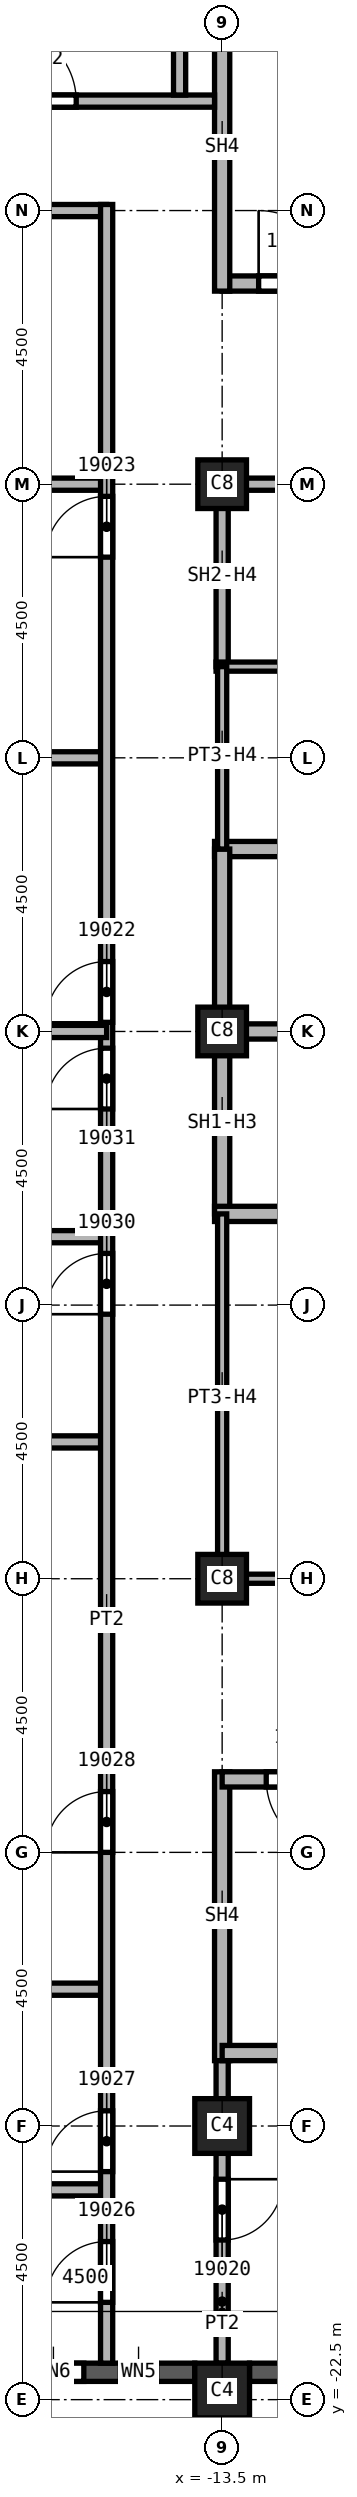
"""IFC4 building model, lengths in metres.
Left out: names, types, materials, properties, quantities, classifications, styles, units other than length and angle.
Written with IfcOpenShell. Run it as: python <this file> out.ifc"""

import sys

from ifc_helpers import new_model, si_unit, direction, frame, frame_2d, origin, origin_2d, place, context, subcontext, project, spatial, rectangle, extrude, element, fill, save


model = new_model("IFC4")
c1 = context("Model", 3, precision=1e-05, world=origin(), true_north=direction((0.0, 1.0)))
c2 = subcontext(c1, "Body", "Model", "MODEL_VIEW")
j1 = project(units=[si_unit("LENGTHUNIT", "METRE"), si_unit("PLANEANGLEUNIT", "RADIAN")], contexts=[c1])
p1 = place(None, origin())
s1 = spatial("IfcSite", under=j1, at=p1, CompositionType="ELEMENT")
p2 = place(p1, origin())
s2 = spatial("IfcBuilding", under=s1, at=p2, CompositionType="ELEMENT")
p3 = place(p2, frame((0.0, 0.0, 278.0)))
s3 = spatial("IfcBuildingStorey", under=s2, at=p3, CompositionType="ELEMENT", Elevation=278.0)
p4 = place(p3, frame((-13.5, -18.0, 0.0), z_axis=(0.0, 0.0, 1.0), x_axis=(1.0, 0.0, 0.0)))
e1 = element("IfcColumn", 1, at=p4, inside=s3, PredefinedType="COLUMN", context=c2, shape_type="SweptSolid", body=[
    extrude(rectangle(XDim=0.9, YDim=0.9, at=origin_2d()), origin(), (0.0, 0.0, 1.0), 3.72),
])
for number, where, z_axis, x_axis in (
    (2, (-13.5, 0.0, 0.0), (0.0, 0.0, 1.0), (1.0, 0.0, 0.0)),
    (3, (-13.5, 9.0, 0.0), (0.0, 0.0, 1.0), (1.0, 0.0, 0.0)),
    (4, (-13.5, -9.0, 0.0), (0.0, 0.0, 1.0), (1.0, 0.0, 0.0)),
):
    element("IfcColumn", number, at=place(p3, frame(where, z_axis=z_axis, x_axis=x_axis)), inside=s3, PredefinedType="COLUMN", context=c2, shape_type="SweptSolid", body=[
        extrude(rectangle(XDim=0.8, YDim=0.8, at=origin_2d()), origin(), (0.0, 0.0, 1.0), 3.72),
    ])
p5 = place(p3, frame((-13.5, -22.35, 0.0), z_axis=(0.0, 0.0, 1.0), x_axis=(1.0, 0.0, 0.0)))
e5 = element("IfcColumn", 5, at=p5, inside=s3, PredefinedType="COLUMN", context=c2, shape_type="SweptSolid", body=[
    extrude(rectangle(XDim=0.9, YDim=0.9, at=origin_2d()), origin(), (0.0, 0.0, 1.0), 3.72),
])
p6 = place(p3, frame((-17.55, -22.05, 0.0), z_axis=(0.0, 0.0, 1.0), x_axis=(1.0, 0.0, 0.0)))
e6 = element("IfcWall", 6, at=p6, inside=s3, PredefinedType="SOLIDWALL", context=c2, shape_type="SweptSolid", body=[
    extrude(rectangle(XDim=3.6, YDim=0.3, at=frame_2d((1.8, 0.0))), origin(), (0.0, 0.0, 1.0), 3.12),
])
p7 = place(p6, frame((0.775, 0.0, 0.8)))
e7 = element("IfcOpeningElement", 7, at=p7, cuts=e6, PredefinedType="OPENING", context=c2, shape_type="SweptSolid", body=[
    extrude(rectangle(XDim=1.0, YDim=1.95, at=frame_2d((0.5, 0.975))), frame((0.0, 0.15, 0.0), z_axis=(0.0, -1.0, 0.0), x_axis=(1.0, 0.0, 0.0)), (0.0, 0.0, 1.0), 0.3),
])
p8 = place(p6, frame((2.375, 0.0, 0.8)))
e8 = element("IfcOpeningElement", 8, at=p8, cuts=e6, PredefinedType="OPENING", context=c2, shape_type="SweptSolid", body=[
    extrude(rectangle(XDim=0.6, YDim=1.95, at=frame_2d((0.3, 0.975))), frame((0.0, 0.15, 0.0), z_axis=(0.0, -1.0, 0.0), x_axis=(1.0, 0.0, 0.0)), (0.0, 0.0, 1.0), 0.3),
])
p9 = place(p3, frame((-13.05, -22.05, 0.0), z_axis=(0.0, 0.0, 1.0), x_axis=(1.0, 0.0, 0.0)))
e9 = element("IfcWall", 9, at=p9, inside=s3, PredefinedType="SOLIDWALL", context=c2, shape_type="SweptSolid", body=[
    extrude(rectangle(XDim=3.6, YDim=0.3, at=frame_2d((1.8, 0.0))), origin(), (0.0, 0.0, 1.0), 3.12),
])
p10 = place(p9, frame((0.6, 0.0, 0.8)))
e10 = element("IfcOpeningElement", 10, at=p10, cuts=e9, PredefinedType="OPENING", context=c2, shape_type="SweptSolid", body=[
    extrude(rectangle(XDim=2.4, YDim=1.95, at=frame_2d((1.2, 0.975))), frame((0.0, 0.15, 0.0), z_axis=(0.0, -1.0, 0.0), x_axis=(1.0, 0.0, 0.0)), (0.0, 0.0, 1.0), 0.3),
])
for number, where, z_axis, x_axis in (
    (11, (-26.55, -15.75, 0.0), (0.0, 0.0, 1.0), (1.0, 0.0, 0.0)),
    (12, (-26.55, -6.75, 0.0), (0.0, 0.0, 1.0), (1.0, 0.0, 0.0)),
    (13, (-26.55, -3.375, 0.0), (0.0, 0.0, 1.0), (1.0, 0.0, 0.0)),
    (14, (-26.55, 4.5, 0.0), (0.0, 0.0, 1.0), (1.0, 0.0, 0.0)),
    (15, (-26.55, 9.0, 0.0), (0.0, 0.0, 1.0), (1.0, 0.0, 0.0)),
):
    element("IfcWall", number, at=place(p3, frame(where, z_axis=z_axis, x_axis=x_axis)), inside=s3, PredefinedType="PARTITIONING", context=c2, shape_type="SweptSolid", body=[
        extrude(rectangle(XDim=11.15, YDim=0.2, at=frame_2d((5.575, 0.0))), origin(), (0.0, 0.0, 1.0), 3.72),
    ])
p11 = place(p3, frame((-24.3, -19.05, 0.0), z_axis=(0.0, 0.0, 1.0), x_axis=(1.0, 0.0, 0.0)))
e16 = element("IfcWall", 16, at=p11, inside=s3, PredefinedType="PARTITIONING", context=c2, shape_type="SweptSolid", body=[
    extrude(rectangle(XDim=8.9, YDim=0.2, at=frame_2d((4.45, 0.0))), origin(), (0.0, 0.0, 1.0), 3.72),
])
p12 = place(p3, frame((-15.4, 13.5, 0.0), z_axis=(0.0, 0.0, 1.0), x_axis=(-1.0, 0.0, 0.0)))
e17 = element("IfcWall", 17, at=p12, inside=s3, PredefinedType="PARTITIONING", context=c2, shape_type="SweptSolid", body=[
    extrude(rectangle(XDim=6.6, YDim=0.2, at=frame_2d((3.3, 0.0))), origin(), (0.0, 0.0, 1.0), 3.72),
])
p13 = place(p12, frame((4.0, 0.0, 0.0)))
e18 = element("IfcOpeningElement", 18, at=p13, cuts=e17, PredefinedType="OPENING", context=c2, shape_type="SweptSolid", body=[
    extrude(rectangle(XDim=1.0, YDim=2.1, at=frame_2d((0.5, 1.05))), frame((0.0, 0.1, 0.0), z_axis=(0.0, -1.0, 0.0), x_axis=(1.0, 0.0, 0.0)), (0.0, 0.0, 1.0), 0.2),
])
p14 = place(p3, frame((-15.4, -21.9, 0.0), z_axis=(0.0, 0.0, 1.0), x_axis=(0.0, 1.0, 0.0)))
e19 = element("IfcWall", 19, at=p14, inside=s3, PredefinedType="PARTITIONING", context=c2, shape_type="SweptSolid", body=[
    extrude(rectangle(XDim=35.5, YDim=0.2, at=frame_2d((17.75, 0.0))), origin(), (0.0, 0.0, 1.0), 3.72),
])
p15 = place(p14, frame((22.05, 0.0, 0.0)))
e20 = element("IfcOpeningElement", 20, at=p15, cuts=e19, PredefinedType="OPENING", context=c2, shape_type="SweptSolid", body=[
    extrude(rectangle(XDim=1.0, YDim=2.1, at=frame_2d((0.5, 1.05))), frame((0.0, 0.1, 0.0), z_axis=(0.0, -1.0, 0.0), x_axis=(1.0, 0.0, 0.0)), (0.0, 0.0, 1.0), 0.2),
])
p16 = place(p14, frame((29.7, 0.0, 0.0)))
e21 = element("IfcOpeningElement", 21, at=p16, cuts=e19, PredefinedType="OPENING", context=c2, shape_type="SweptSolid", body=[
    extrude(rectangle(XDim=1.0, YDim=2.1, at=frame_2d((0.5, 1.05))), frame((0.0, 0.1, 0.0), z_axis=(0.0, -1.0, 0.0), x_axis=(1.0, 0.0, 0.0)), (0.0, 0.0, 1.0), 0.2),
])
p17 = place(p14, frame((1.0, 0.0, 0.0)))
e22 = element("IfcOpeningElement", 22, at=p17, cuts=e19, PredefinedType="OPENING", context=c2, shape_type="SweptSolid", body=[
    extrude(rectangle(XDim=1.0, YDim=2.1, at=frame_2d((0.5, 1.05))), frame((0.0, 0.1, 0.0), z_axis=(0.0, -1.0, 0.0), x_axis=(1.0, 0.0, 0.0)), (0.0, 0.0, 1.0), 0.2),
])
p18 = place(p14, frame((3.15, 0.0, 0.0)))
e23 = element("IfcOpeningElement", 23, at=p18, cuts=e19, PredefinedType="OPENING", context=c2, shape_type="SweptSolid", body=[
    extrude(rectangle(XDim=1.0, YDim=2.1, at=frame_2d((0.5, 1.05))), frame((0.0, 0.1, 0.0), z_axis=(0.0, -1.0, 0.0), x_axis=(1.0, 0.0, 0.0)), (0.0, 0.0, 1.0), 0.2),
])
p19 = place(p14, frame((8.4, 0.0, 0.0)))
e24 = element("IfcOpeningElement", 24, at=p19, cuts=e19, PredefinedType="OPENING", context=c2, shape_type="SweptSolid", body=[
    extrude(rectangle(XDim=1.0, YDim=2.1, at=frame_2d((0.5, 1.05))), frame((0.0, 0.1, 0.0), z_axis=(0.0, -1.0, 0.0), x_axis=(1.0, 0.0, 0.0)), (0.0, 0.0, 1.0), 0.2),
])
p20 = place(p14, frame((17.25, 0.0, 0.0)))
e25 = element("IfcOpeningElement", 25, at=p20, cuts=e19, PredefinedType="OPENING", context=c2, shape_type="SweptSolid", body=[
    extrude(rectangle(XDim=1.0, YDim=2.1, at=frame_2d((0.5, 1.05))), frame((0.0, 0.1, 0.0), z_axis=(0.0, -1.0, 0.0), x_axis=(1.0, 0.0, 0.0)), (0.0, 0.0, 1.0), 0.2),
])
p21 = place(p14, frame((20.625, 0.0, 0.0)))
e26 = element("IfcOpeningElement", 26, at=p21, cuts=e19, PredefinedType="OPENING", context=c2, shape_type="SweptSolid", body=[
    extrude(rectangle(XDim=1.0, YDim=2.1, at=frame_2d((0.5, 1.05))), frame((0.0, 0.1, 0.0), z_axis=(0.0, -1.0, 0.0), x_axis=(1.0, 0.0, 0.0)), (0.0, 0.0, 1.0), 0.2),
])
p22 = place(p3, frame((-15.4, 0.0, 0.0), z_axis=(0.0, 0.0, 1.0), x_axis=(-1.0, 0.0, 0.0)))
e27 = element("IfcWall", 27, at=p22, inside=s3, PredefinedType="PARTITIONING", context=c2, shape_type="SweptSolid", body=[
    extrude(rectangle(XDim=11.15, YDim=0.2, at=frame_2d((5.575, 0.0))), origin(), (0.0, 0.0, 1.0), 3.72),
])
p23 = place(p3, frame((-13.5, -16.675, 0.0), z_axis=(0.0, 0.0, 1.0), x_axis=(0.0, -1.0, 0.0)))
e28 = element("IfcWall", 28, at=p23, inside=s3, PredefinedType="PARTITIONING", context=c2, shape_type="SweptSolid", body=[
    extrude(rectangle(XDim=5.225, YDim=0.2, at=frame_2d((2.612, 0.0))), origin(), (0.0, 0.0, 1.0), 3.72),
])
p24 = place(p23, frame((2.2, 0.0, 0.0)))
e29 = element("IfcOpeningElement", 29, at=p24, cuts=e28, PredefinedType="OPENING", context=c2, shape_type="SweptSolid", body=[
    extrude(rectangle(XDim=1.0, YDim=2.1, at=frame_2d((0.5, 1.05))), frame((0.0, 0.1, 0.0), z_axis=(0.0, -1.0, 0.0), x_axis=(1.0, 0.0, 0.0)), (0.0, 0.0, 1.0), 0.2),
])
p25 = place(p3, frame((-13.5, 6.0, 0.0), z_axis=(0.0, 0.0, 1.0), x_axis=(0.0, 1.0, 0.0)))
e30 = element("IfcWall", 30, at=p25, inside=s3, PredefinedType="SOLIDWALL", context=c2, shape_type="SweptSolid", body=[
    extrude(rectangle(XDim=3.1, YDim=0.2, at=frame_2d((1.55, 0.0))), origin(), (0.0, 0.0, 1.0), 3.042),
])
p26 = place(p3, frame((-13.5, 9.0, 0.0), z_axis=(0.0, 0.0, 1.0), x_axis=(1.0, 0.0, 0.0)))
e31 = element("IfcWall", 31, at=p26, inside=s3, PredefinedType="SOLIDWALL", context=c2, shape_type="SweptSolid", body=[
    extrude(rectangle(XDim=3.0, YDim=0.2, at=frame_2d((1.5, 0.0))), origin(), (0.0, 0.0, 1.0), 3.042),
])
p27 = place(p3, frame((-13.625, 0.0, 0.0), z_axis=(0.0, 0.0, 1.0), x_axis=(1.0, 0.0, 0.0)))
e32 = element("IfcWall", 32, at=p27, inside=s3, PredefinedType="SOLIDWALL", context=c2, shape_type="SweptSolid", body=[
    extrude(rectangle(XDim=3.125, YDim=0.25, at=frame_2d((1.562, 0.0))), origin(), (0.0, 0.0, 1.0), 3.72),
])
p28 = place(p3, frame((-13.625, 3.0, 0.0), z_axis=(0.0, 0.0, 1.0), x_axis=(1.0, 0.0, 0.0)))
e33 = element("IfcWall", 33, at=p28, inside=s3, PredefinedType="SOLIDWALL", context=c2, shape_type="SweptSolid", body=[
    extrude(rectangle(XDim=9.25, YDim=0.25, at=frame_2d((4.625, 0.0))), origin(), (0.0, 0.0, 1.0), 3.72),
])
p29 = place(p28, frame((3.25, 0.0, 0.0)))
e34 = element("IfcOpeningElement", 34, at=p29, cuts=e33, PredefinedType="OPENING", context=c2, shape_type="SweptSolid", body=[
    extrude(rectangle(XDim=1.1, YDim=2.1, at=frame_2d((0.55, 1.05))), frame((0.0, 0.125, 0.0), z_axis=(0.0, -1.0, 0.0), x_axis=(1.0, 0.0, 0.0)), (0.0, 0.0, 1.0), 0.25),
])
p30 = place(p3, frame((-13.5, -3.0, 0.0), z_axis=(0.0, 0.0, 1.0), x_axis=(0.0, 1.0, 0.0)))
e35 = element("IfcWall", 35, at=p30, inside=s3, PredefinedType="SOLIDWALL", context=c2, shape_type="SweptSolid", body=[
    extrude(rectangle(XDim=6.0, YDim=0.25, at=frame_2d((3.0, 0.0))), origin(), (0.0, 0.0, 1.0), 3.042),
])
p31 = place(p3, frame((-13.625, -3.0, 0.0), z_axis=(0.0, 0.0, 1.0), x_axis=(1.0, 0.0, 0.0)))
e36 = element("IfcWall", 36, at=p31, inside=s3, PredefinedType="SOLIDWALL", context=c2, shape_type="SweptSolid", body=[
    extrude(rectangle(XDim=6.125, YDim=0.25, at=frame_2d((3.062, 0.0))), origin(), (0.0, 0.0, 1.0), 3.72),
])
p32 = place(p31, frame((3.25, 0.0, 0.0)))
e37 = element("IfcOpeningElement", 37, at=p32, cuts=e36, PredefinedType="OPENING", context=c2, shape_type="SweptSolid", body=[
    extrude(rectangle(XDim=1.1, YDim=2.1, at=frame_2d((0.55, 1.05))), frame((0.0, 0.125, 0.0), z_axis=(0.0, -1.0, 0.0), x_axis=(1.0, 0.0, 0.0)), (0.0, 0.0, 1.0), 0.25),
])
p33 = place(p3, frame((-13.5, -12.175, 0.0), z_axis=(0.0, 0.0, 1.0), x_axis=(0.0, -1.0, 0.0)))
e38 = element("IfcWall", 38, at=p33, inside=s3, PredefinedType="SOLIDWALL", context=c2, shape_type="SweptSolid", body=[
    extrude(rectangle(XDim=4.75, YDim=0.25, at=frame_2d((2.375, 0.0))), origin(), (0.0, 0.0, 1.0), 3.72),
])
p34 = place(p3, frame((-13.5, 12.3, 0.0), z_axis=(0.0, 0.0, 1.0), x_axis=(1.0, 0.0, 0.0)))
e39 = element("IfcWall", 39, at=p34, inside=s3, PredefinedType="SOLIDWALL", context=c2, shape_type="SweptSolid", body=[
    extrude(rectangle(XDim=9.125, YDim=0.25, at=frame_2d((4.562, 0.0))), origin(), (0.0, 0.0, 1.0), 3.72),
])
p35 = place(p34, frame((0.6, 0.0, 0.0)))
e40 = element("IfcOpeningElement", 40, at=p35, cuts=e39, PredefinedType="OPENING", context=c2, shape_type="SweptSolid", body=[
    extrude(rectangle(XDim=1.2, YDim=2.1, at=frame_2d((0.6, 1.05))), frame((0.0, 0.125, 0.0), z_axis=(0.0, -1.0, 0.0), x_axis=(1.0, 0.0, 0.0)), (0.0, 0.0, 1.0), 0.25),
])
p36 = place(p3, frame((-13.5, 16.78, 0.0), z_axis=(0.0, 0.0, 1.0), x_axis=(0.0, -1.0, 0.0)))
e41 = element("IfcWall", 41, at=p36, inside=s3, PredefinedType="SOLIDWALL", context=c2, shape_type="SweptSolid", body=[
    extrude(rectangle(XDim=4.605, YDim=0.25, at=frame_2d((2.302, 0.0))), origin(), (0.0, 0.0, 1.0), 3.72),
])
p37 = place(p3, frame((-4.5, -16.8, 0.0), z_axis=(0.0, 0.0, 1.0), x_axis=(-1.0, 0.0, 0.0)))
e42 = element("IfcWall", 42, at=p37, inside=s3, PredefinedType="SOLIDWALL", context=c2, shape_type="SweptSolid", body=[
    extrude(rectangle(XDim=9.0, YDim=0.25, at=frame_2d((4.5, 0.0))), origin(), (0.0, 0.0, 1.0), 3.72),
])
p38 = place(p3, frame((-4.375, -12.3, 0.0), z_axis=(0.0, 0.0, 1.0), x_axis=(-1.0, 0.0, 0.0)))
e43 = element("IfcWall", 43, at=p38, inside=s3, PredefinedType="SOLIDWALL", context=c2, shape_type="SweptSolid", body=[
    extrude(rectangle(XDim=9.125, YDim=0.25, at=frame_2d((4.562, 0.0))), origin(), (0.0, 0.0, 1.0), 3.72),
])
p39 = place(p38, frame((7.2, 0.0, 0.0)))
e44 = element("IfcOpeningElement", 44, at=p39, cuts=e43, PredefinedType="OPENING", context=c2, shape_type="SweptSolid", body=[
    extrude(rectangle(XDim=1.2, YDim=2.1, at=frame_2d((0.6, 1.05))), frame((0.0, 0.125, 0.0), z_axis=(0.0, -1.0, 0.0), x_axis=(1.0, 0.0, 0.0)), (0.0, 0.0, 1.0), 0.25),
])
p40 = place(p3, frame((-13.6, 6.0, 0.0), z_axis=(0.0, 0.0, 1.0), x_axis=(1.0, 0.0, 0.0)))
e45 = element("IfcWall", 45, at=p40, inside=s3, PredefinedType="PARTITIONING", context=c2, shape_type="SweptSolid", body=[
    extrude(rectangle(XDim=3.1, YDim=0.15, at=frame_2d((1.55, 0.0))), origin(), (0.0, 0.0, 1.0), 3.72),
])
p41 = place(p3, frame((-13.5, -9.075, 0.0), z_axis=(0.0, 0.0, 1.0), x_axis=(0.0, 1.0, 0.0)))
e46 = element("IfcWall", 46, at=p41, inside=s3, PredefinedType="PARTITIONING", context=c2, shape_type="SweptSolid", body=[
    extrude(rectangle(XDim=6.075, YDim=0.15, at=frame_2d((3.038, 0.0))), origin(), (0.0, 0.0, 1.0), 3.042),
])
for number, where, z_axis, x_axis in (
    (47, (-13.5, 3.0, 0.0), (0.0, 0.0, 1.0), (0.0, 1.0, 0.0)),
    (48, (-10.5, -9.0, 0.0), (0.0, 0.0, 1.0), (-1.0, 0.0, 0.0)),
):
    element("IfcWall", number, at=place(p3, frame(where, z_axis=z_axis, x_axis=x_axis)), inside=s3, PredefinedType="PARTITIONING", context=c2, shape_type="SweptSolid", body=[
        extrude(rectangle(XDim=3.0, YDim=0.15, at=frame_2d((1.5, 0.0))), origin(), (0.0, 0.0, 1.0), 3.042),
    ])
p42 = place(p3, frame((-21.9, 15.3, 0.0), z_axis=(0.0, 0.0, 1.0), x_axis=(1.0, 0.0, 0.0)))
e49 = element("IfcWall", 49, at=p42, inside=s3, PredefinedType="SOLIDWALL", context=c2, shape_type="SweptSolid", body=[
    extrude(rectangle(XDim=8.275, YDim=0.2, at=frame_2d((4.137, 0.0))), origin(), (0.0, 0.0, 1.0), 3.72),
])
p43 = place(p42, frame((4.8, 0.0, 0.0)))
e50 = element("IfcOpeningElement", 50, at=p43, cuts=e49, PredefinedType="OPENING", context=c2, shape_type="SweptSolid", body=[
    extrude(rectangle(XDim=1.2, YDim=2.1, at=frame_2d((0.6, 1.05))), frame((0.0, 0.1, 0.0), z_axis=(0.0, -1.0, 0.0), x_axis=(1.0, 0.0, 0.0)), (0.0, 0.0, 1.0), 0.2),
])
p44 = place(p3, frame((-14.2, 15.4, 0.0), z_axis=(0.0, 0.0, 1.0), x_axis=(0.0, 1.0, 0.0)))
e51 = element("IfcWall", 51, at=p44, inside=s3, PredefinedType="SOLIDWALL", context=c2, shape_type="SweptSolid", body=[
    extrude(rectangle(XDim=5.9, YDim=0.2, at=frame_2d((2.95, 0.0))), origin(), (0.0, 0.0, 1.0), 3.72),
])
p45 = place(p35, origin())
e52 = element("IfcDoor", 52, at=p45, inside=s3, OperationType="SINGLE_SWING_RIGHT", PredefinedType="DOOR", context=c2, shape_type="SweptSolid", body=[
    extrude(rectangle(XDim=1.2, YDim=2.1, at=frame_2d((0.6, 1.05))), frame((0.0, 0.025, 0.0), z_axis=(0.0, -1.0, 0.0), x_axis=(1.0, 0.0, 0.0)), (0.0, 0.0, 1.0), 0.05),
])
fill(e40, e52)
p46 = place(p39, origin())
e53 = element("IfcDoor", 53, at=p46, inside=s3, OperationType="SINGLE_SWING_LEFT", PredefinedType="DOOR", context=c2, shape_type="SweptSolid", body=[
    extrude(rectangle(XDim=1.2, YDim=2.1, at=frame_2d((0.6, 1.05))), frame((0.0, 0.025, 0.0), z_axis=(0.0, -1.0, 0.0), x_axis=(1.0, 0.0, 0.0)), (0.0, 0.0, 1.0), 0.05),
])
fill(e44, e53)
p47 = place(p24, origin())
e54 = element("IfcDoor", 54, at=p47, inside=s3, OperationType="SINGLE_SWING_LEFT", PredefinedType="DOOR", context=c2, shape_type="SweptSolid", body=[
    extrude(rectangle(XDim=1.0, YDim=2.1, at=frame_2d((0.5, 1.05))), frame((0.0, 0.025, 0.0), z_axis=(0.0, -1.0, 0.0), x_axis=(1.0, 0.0, 0.0)), (0.0, 0.0, 1.0), 0.05),
])
fill(e29, e54)
p48 = place(p15, origin())
e55 = element("IfcDoor", 55, at=p48, inside=s3, OperationType="SINGLE_SWING_LEFT", PredefinedType="DOOR", context=c2, shape_type="SweptSolid", body=[
    extrude(rectangle(XDim=1.0, YDim=2.1, at=frame_2d((0.5, 1.05))), frame((0.0, 0.025, 0.0), z_axis=(0.0, -1.0, 0.0), x_axis=(1.0, 0.0, 0.0)), (0.0, 0.0, 1.0), 0.05),
])
fill(e20, e55)
p49 = place(p16, origin())
e56 = element("IfcDoor", 56, at=p49, inside=s3, OperationType="SINGLE_SWING_RIGHT", PredefinedType="DOOR", context=c2, shape_type="SweptSolid", body=[
    extrude(rectangle(XDim=1.0, YDim=2.1, at=frame_2d((0.5, 1.05))), frame((0.0, 0.025, 0.0), z_axis=(0.0, -1.0, 0.0), x_axis=(1.0, 0.0, 0.0)), (0.0, 0.0, 1.0), 0.05),
])
fill(e21, e56)
p50 = place(p17, origin())
e57 = element("IfcDoor", 57, at=p50, inside=s3, OperationType="SINGLE_SWING_LEFT", PredefinedType="DOOR", context=c2, shape_type="SweptSolid", body=[
    extrude(rectangle(XDim=1.0, YDim=2.1, at=frame_2d((0.5, 1.05))), frame((0.0, 0.025, 0.0), z_axis=(0.0, -1.0, 0.0), x_axis=(1.0, 0.0, 0.0)), (0.0, 0.0, 1.0), 0.05),
])
fill(e22, e57)
p51 = place(p18, origin())
e58 = element("IfcDoor", 58, at=p51, inside=s3, OperationType="SINGLE_SWING_RIGHT", PredefinedType="DOOR", context=c2, shape_type="SweptSolid", body=[
    extrude(rectangle(XDim=1.0, YDim=2.1, at=frame_2d((0.5, 1.05))), frame((0.0, 0.025, 0.0), z_axis=(0.0, -1.0, 0.0), x_axis=(1.0, 0.0, 0.0)), (0.0, 0.0, 1.0), 0.05),
])
fill(e23, e58)
p52 = place(p19, origin())
e59 = element("IfcDoor", 59, at=p52, inside=s3, OperationType="SINGLE_SWING_LEFT", PredefinedType="DOOR", context=c2, shape_type="SweptSolid", body=[
    extrude(rectangle(XDim=1.0, YDim=2.1, at=frame_2d((0.5, 1.05))), frame((0.0, 0.025, 0.0), z_axis=(0.0, -1.0, 0.0), x_axis=(1.0, 0.0, 0.0)), (0.0, 0.0, 1.0), 0.05),
])
fill(e24, e59)
p53 = place(p20, origin())
e60 = element("IfcDoor", 60, at=p53, inside=s3, OperationType="SINGLE_SWING_LEFT", PredefinedType="DOOR", context=c2, shape_type="SweptSolid", body=[
    extrude(rectangle(XDim=1.0, YDim=2.1, at=frame_2d((0.5, 1.05))), frame((0.0, 0.025, 0.0), z_axis=(0.0, -1.0, 0.0), x_axis=(1.0, 0.0, 0.0)), (0.0, 0.0, 1.0), 0.05),
])
fill(e25, e60)
p54 = place(p21, origin())
e61 = element("IfcDoor", 61, at=p54, inside=s3, OperationType="SINGLE_SWING_RIGHT", PredefinedType="DOOR", context=c2, shape_type="SweptSolid", body=[
    extrude(rectangle(XDim=1.0, YDim=2.1, at=frame_2d((0.5, 1.05))), frame((0.0, 0.025, 0.0), z_axis=(0.0, -1.0, 0.0), x_axis=(1.0, 0.0, 0.0)), (0.0, 0.0, 1.0), 0.05),
])
fill(e26, e61)
p55 = place(p43, origin())
e62 = element("IfcDoor", 62, at=p55, inside=s3, OperationType="SINGLE_SWING_RIGHT", PredefinedType="DOOR", context=c2, shape_type="SweptSolid", body=[
    extrude(rectangle(XDim=1.2, YDim=2.1, at=frame_2d((0.6, 1.05))), frame((0.0, 0.025, 0.0), z_axis=(0.0, -1.0, 0.0), x_axis=(1.0, 0.0, 0.0)), (0.0, 0.0, 1.0), 0.05),
])
fill(e50, e62)
p56 = place(p7, origin())
e63 = element("IfcWindow", 63, at=p56, inside=s3, PartitioningType="SINGLE_PANEL", PredefinedType="WINDOW", context=c2, shape_type="SweptSolid", body=[
    extrude(rectangle(XDim=1.0, YDim=1.95, at=frame_2d((0.5, 0.975))), frame((0.0, 0.03, 0.0), z_axis=(0.0, -1.0, 0.0), x_axis=(1.0, 0.0, 0.0)), (0.0, 0.0, 1.0), 0.06),
])
fill(e7, e63)
p57 = place(p8, origin())
e64 = element("IfcWindow", 64, at=p57, inside=s3, PartitioningType="SINGLE_PANEL", PredefinedType="WINDOW", context=c2, shape_type="SweptSolid", body=[
    extrude(rectangle(XDim=0.6, YDim=1.95, at=frame_2d((0.3, 0.975))), frame((0.0, 0.03, 0.0), z_axis=(0.0, -1.0, 0.0), x_axis=(1.0, 0.0, 0.0)), (0.0, 0.0, 1.0), 0.06),
])
fill(e8, e64)
save(model, sys.argv[1])
